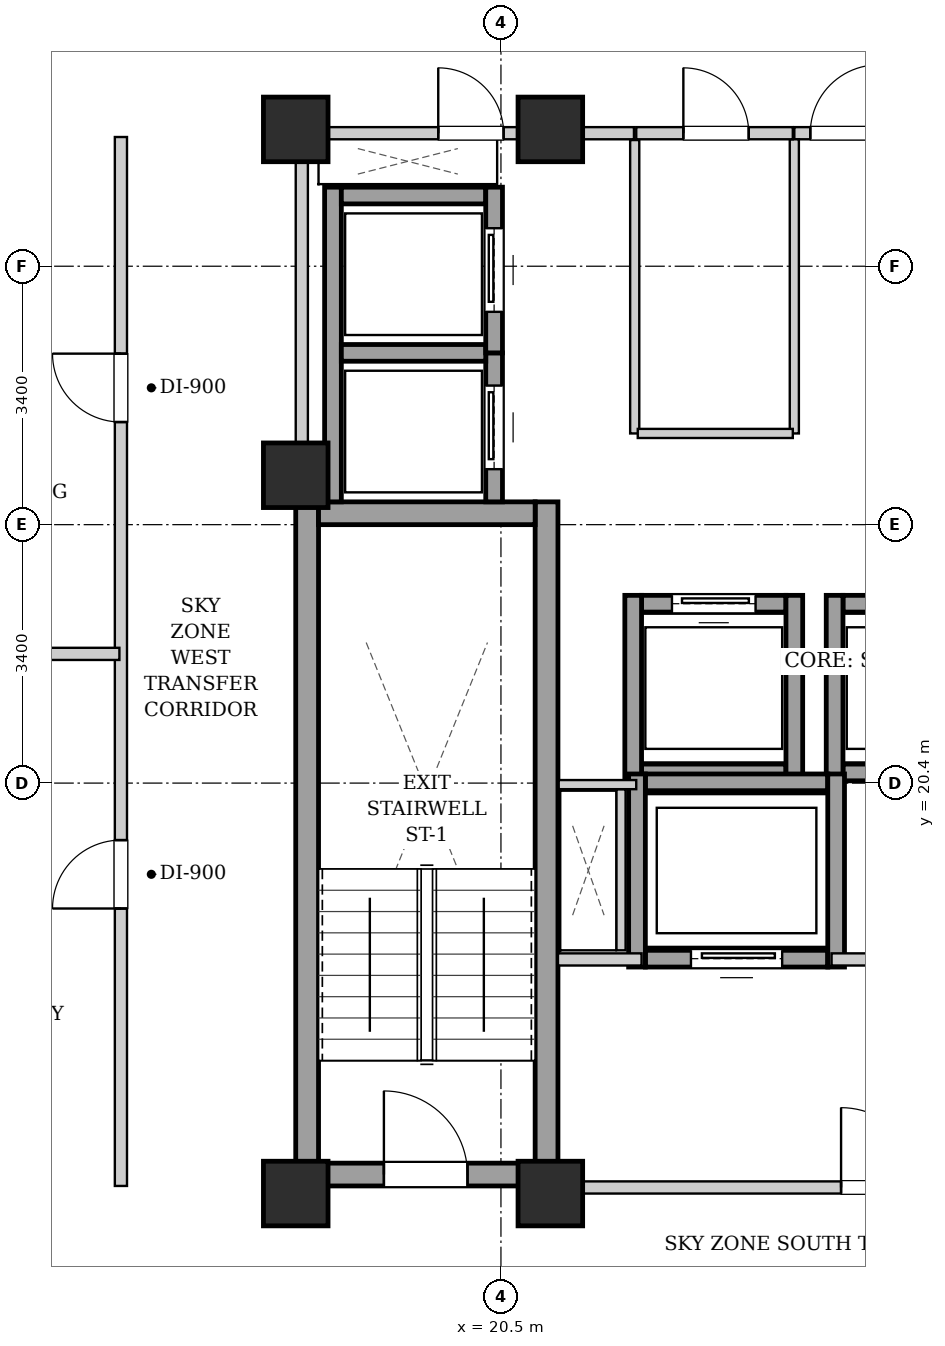
"""IFC4 building model, lengths in metres.
Left out: names, types, materials, properties, quantities, classifications, styles, units other than length and angle.
Written with IfcOpenShell. Run it as: python <this file> out.ifc"""

import sys

from ifc_helpers import new_model, si_unit, direction, frame, frame_2d, origin, origin_2d, place, context, subcontext, project, spatial, rectangle, extrude, element, fill, save


model = new_model("IFC4")
c1 = context("Model", 3, precision=1e-05, world=origin(), true_north=direction((0.0, 1.0)))
c2 = subcontext(c1, "Body", "Model", "MODEL_VIEW")
j1 = project(units=[si_unit("LENGTHUNIT", "METRE"), si_unit("PLANEANGLEUNIT", "RADIAN")], contexts=[c1])
p1 = place(None, origin())
s1 = spatial("IfcSite", under=j1, at=p1, CompositionType="ELEMENT")
p2 = place(p1, origin())
s2 = spatial("IfcBuilding", under=s1, at=p2, CompositionType="ELEMENT")
p3 = place(p2, frame((0.0, 0.0, 174.4)))
s3 = spatial("IfcBuildingStorey", under=s2, at=p3, CompositionType="ELEMENT", Elevation=174.4)
for number, where, z_axis, x_axis in (
    (1, (17.8, 15.0, 0.0), (0.0, 0.0, 1.0), (1.0, 0.0, 0.0)),
    (2, (21.15, 15.0, 0.0), (0.0, 0.0, 1.0), (1.0, 0.0, 0.0)),
    (3, (17.8, 29.0, 0.0), (0.0, 0.0, 1.0), (1.0, 0.0, 0.0)),
    (4, (21.15, 29.0, 0.0), (0.0, 0.0, 1.0), (1.0, 0.0, 0.0)),
    (5, (17.8, 24.45, 0.0), (0.0, 0.0, 1.0), (1.0, 0.0, 0.0)),
):
    element("IfcColumn", number, at=place(p3, frame(where, z_axis=z_axis, x_axis=x_axis)), inside=s3, PredefinedType="COLUMN", context=c2, shape_type="SweptSolid", body=[
        extrude(rectangle(XDim=0.85, YDim=0.85, at=origin_2d()), origin(), (0.0, 0.0, 1.0), 3.3),
    ])
for number, where, z_axis, x_axis in (
    (6, (17.95, 15.1, 0.0), (0.0, 0.0, 1.0), (0.0, 1.0, 0.0)),
    (7, (21.1, 15.1, 0.0), (0.0, 0.0, 1.0), (0.0, 1.0, 0.0)),
):
    element("IfcWall", number, at=place(p3, frame(where, z_axis=z_axis, x_axis=x_axis)), inside=s3, PredefinedType="SHEAR", context=c2, shape_type="SweptSolid", body=[
        extrude(rectangle(XDim=9.0, YDim=0.3, at=frame_2d((4.5, 0.0))), origin(), (0.0, 0.0, 1.0), 3.04),
    ])
p4 = place(p3, frame((18.1, 23.95, 0.0), z_axis=(0.0, 0.0, 1.0), x_axis=(1.0, 0.0, 0.0)))
e8 = element("IfcWall", 8, at=p4, inside=s3, PredefinedType="SHEAR", context=c2, shape_type="SweptSolid", body=[
    extrude(rectangle(XDim=2.85, YDim=0.3, at=frame_2d((1.425, 0.0))), origin(), (0.0, 0.0, 1.0), 3.04),
])
p5 = place(p3, frame((18.1, 15.25, 0.0), z_axis=(0.0, 0.0, 1.0), x_axis=(1.0, 0.0, 0.0)))
e9 = element("IfcWall", 9, at=p5, inside=s3, PredefinedType="SHEAR", context=c2, shape_type="SweptSolid", body=[
    extrude(rectangle(XDim=2.85, YDim=0.3, at=frame_2d((1.425, 0.0))), origin(), (0.0, 0.0, 1.0), 3.04),
])
p6 = place(p5, frame((0.86, 0.0, 0.0)))
e10 = element("IfcOpeningElement", 10, at=p6, cuts=e9, PredefinedType="OPENING", context=c2, shape_type="SweptSolid", body=[
    extrude(rectangle(XDim=1.1, YDim=2.05, at=frame_2d((0.55, 1.025))), frame((0.0, 0.16, 0.0), z_axis=(0.0, -1.0, 0.0), x_axis=(1.0, 0.0, 0.0)), (0.0, 0.0, 1.0), 0.32),
])
p7 = place(p3, frame((22.35, 20.54, 0.0), z_axis=(0.0, 0.0, 1.0), x_axis=(1.0, 0.0, 0.0)))
e11 = element("IfcWall", 11, at=p7, inside=s3, PredefinedType="SHEAR", context=c2, shape_type="SweptSolid", body=[
    extrude(rectangle(XDim=1.9, YDim=0.22, at=frame_2d((0.95, 0.0))), origin(), (0.0, 0.0, 1.0), 3.04),
])
p8 = place(p3, frame((22.35, 22.76, 0.0), z_axis=(0.0, 0.0, 1.0), x_axis=(1.0, 0.0, 0.0)))
e12 = element("IfcWall", 12, at=p8, inside=s3, PredefinedType="SHEAR", context=c2, shape_type="SweptSolid", body=[
    extrude(rectangle(XDim=1.9, YDim=0.22, at=frame_2d((0.95, 0.0))), origin(), (0.0, 0.0, 1.0), 3.04),
])
p9 = place(p8, frame((0.4, 0.0, 0.0)))
e13 = element("IfcOpeningElement", 13, at=p9, cuts=e12, PredefinedType="OPENING", context=c2, shape_type="SweptSolid", body=[
    extrude(rectangle(XDim=1.1, YDim=2.15, at=frame_2d((0.55, 1.075))), frame((0.0, 0.12, 0.0), z_axis=(0.0, -1.0, 0.0), x_axis=(1.0, 0.0, 0.0)), (0.0, 0.0, 1.0), 0.24),
])
for number, where, z_axis, x_axis in (
    (14, (22.24, 20.43, 0.0), (0.0, 0.0, 1.0), (0.0, 1.0, 0.0)),
    (15, (24.36, 20.43, 0.0), (0.0, 0.0, 1.0), (0.0, 1.0, 0.0)),
):
    element("IfcWall", number, at=place(p3, frame(where, z_axis=z_axis, x_axis=x_axis)), inside=s3, PredefinedType="SHEAR", context=c2, shape_type="SweptSolid", body=[
        extrude(rectangle(XDim=2.44, YDim=0.22, at=frame_2d((1.22, 0.0))), origin(), (0.0, 0.0, 1.0), 3.04),
    ])
p10 = place(p3, frame((25.0, 20.54, 0.0), z_axis=(0.0, 0.0, 1.0), x_axis=(1.0, 0.0, 0.0)))
e16 = element("IfcWall", 16, at=p10, inside=s3, PredefinedType="SHEAR", context=c2, shape_type="SweptSolid", body=[
    extrude(rectangle(XDim=1.9, YDim=0.22, at=frame_2d((0.95, 0.0))), origin(), (0.0, 0.0, 1.0), 3.04),
])
p11 = place(p3, frame((25.0, 22.76, 0.0), z_axis=(0.0, 0.0, 1.0), x_axis=(1.0, 0.0, 0.0)))
e17 = element("IfcWall", 17, at=p11, inside=s3, PredefinedType="SHEAR", context=c2, shape_type="SweptSolid", body=[
    extrude(rectangle(XDim=1.9, YDim=0.22, at=frame_2d((0.95, 0.0))), origin(), (0.0, 0.0, 1.0), 3.04),
])
p12 = place(p11, frame((0.4, 0.0, 0.0)))
e18 = element("IfcOpeningElement", 18, at=p12, cuts=e17, PredefinedType="OPENING", context=c2, shape_type="SweptSolid", body=[
    extrude(rectangle(XDim=1.1, YDim=2.15, at=frame_2d((0.55, 1.075))), frame((0.0, 0.12, 0.0), z_axis=(0.0, -1.0, 0.0), x_axis=(1.0, 0.0, 0.0)), (0.0, 0.0, 1.0), 0.24),
])
p13 = place(p3, frame((24.89, 20.43, 0.0), z_axis=(0.0, 0.0, 1.0), x_axis=(0.0, 1.0, 0.0)))
e19 = element("IfcWall", 19, at=p13, inside=s3, PredefinedType="SHEAR", context=c2, shape_type="SweptSolid", body=[
    extrude(rectangle(XDim=2.44, YDim=0.22, at=frame_2d((1.22, 0.0))), origin(), (0.0, 0.0, 1.0), 3.04),
])
p14 = place(p3, frame((18.29, 24.1, 0.0), z_axis=(0.0, 0.0, 1.0), x_axis=(0.0, 1.0, 0.0)))
e20 = element("IfcWall", 20, at=p14, inside=s3, PredefinedType="SHEAR", context=c2, shape_type="SweptSolid", body=[
    extrude(rectangle(XDim=4.14, YDim=0.22, at=frame_2d((2.07, 0.0))), origin(), (0.0, 0.0, 1.0), 3.04),
])
p15 = place(p3, frame((20.41, 24.1, 0.0), z_axis=(0.0, 0.0, 1.0), x_axis=(0.0, 1.0, 0.0)))
e21 = element("IfcWall", 21, at=p15, inside=s3, PredefinedType="SHEAR", context=c2, shape_type="SweptSolid", body=[
    extrude(rectangle(XDim=1.96, YDim=0.22, at=frame_2d((0.98, 0.0))), origin(), (0.0, 0.0, 1.0), 3.04),
])
p16 = place(p15, frame((0.43, 0.0, 0.0)))
e22 = element("IfcOpeningElement", 22, at=p16, cuts=e21, PredefinedType="OPENING", context=c2, shape_type="SweptSolid", body=[
    extrude(rectangle(XDim=1.1, YDim=2.15, at=frame_2d((0.55, 1.075))), frame((0.0, 0.12, 0.0), z_axis=(0.0, -1.0, 0.0), x_axis=(1.0, 0.0, 0.0)), (0.0, 0.0, 1.0), 0.24),
])
for number, where, z_axis, x_axis in (
    (23, (18.4, 26.06, 0.0), (0.0, 0.0, 1.0), (1.0, 0.0, 0.0)),
    (24, (18.4, 28.13, 0.0), (0.0, 0.0, 1.0), (1.0, 0.0, 0.0)),
):
    element("IfcWall", number, at=place(p3, frame(where, z_axis=z_axis, x_axis=x_axis)), inside=s3, PredefinedType="SHEAR", context=c2, shape_type="SweptSolid", body=[
        extrude(rectangle(XDim=1.9, YDim=0.22, at=frame_2d((0.95, 0.0))), origin(), (0.0, 0.0, 1.0), 3.04),
    ])
p17 = place(p3, frame((20.41, 26.06, 0.0), z_axis=(0.0, 0.0, 1.0), x_axis=(0.0, 1.0, 0.0)))
e25 = element("IfcWall", 25, at=p17, inside=s3, PredefinedType="SHEAR", context=c2, shape_type="SweptSolid", body=[
    extrude(rectangle(XDim=2.18, YDim=0.22, at=frame_2d((1.09, 0.0))), origin(), (0.0, 0.0, 1.0), 3.04),
])
p18 = place(p17, frame((0.54, 0.0, 0.0)))
e26 = element("IfcOpeningElement", 26, at=p18, cuts=e25, PredefinedType="OPENING", context=c2, shape_type="SweptSolid", body=[
    extrude(rectangle(XDim=1.1, YDim=2.15, at=frame_2d((0.55, 1.075))), frame((0.0, 0.12, 0.0), z_axis=(0.0, -1.0, 0.0), x_axis=(1.0, 0.0, 0.0)), (0.0, 0.0, 1.0), 0.24),
])
p19 = place(p3, frame((22.4, 18.09, 0.0), z_axis=(0.0, 0.0, 1.0), x_axis=(1.0, 0.0, 0.0)))
e27 = element("IfcWall", 27, at=p19, inside=s3, PredefinedType="SHEAR", context=c2, shape_type="SweptSolid", body=[
    extrude(rectangle(XDim=2.4, YDim=0.22, at=frame_2d((1.2, 0.0))), origin(), (0.0, 0.0, 1.0), 3.04),
])
p20 = place(p19, frame((0.6, 0.0, 0.0)))
e28 = element("IfcOpeningElement", 28, at=p20, cuts=e27, PredefinedType="OPENING", context=c2, shape_type="SweptSolid", body=[
    extrude(rectangle(XDim=1.2, YDim=2.15, at=frame_2d((0.6, 1.075))), frame((0.0, 0.12, 0.0), z_axis=(0.0, -1.0, 0.0), x_axis=(1.0, 0.0, 0.0)), (0.0, 0.0, 1.0), 0.24),
])
p21 = place(p3, frame((22.4, 20.41, 0.0), z_axis=(0.0, 0.0, 1.0), x_axis=(1.0, 0.0, 0.0)))
e29 = element("IfcWall", 29, at=p21, inside=s3, PredefinedType="SHEAR", context=c2, shape_type="SweptSolid", body=[
    extrude(rectangle(XDim=2.4, YDim=0.22, at=frame_2d((1.2, 0.0))), origin(), (0.0, 0.0, 1.0), 3.04),
])
for number, where, z_axis, x_axis in (
    (30, (22.29, 17.98, 0.0), (0.0, 0.0, 1.0), (0.0, 1.0, 0.0)),
    (31, (24.91, 17.98, 0.0), (0.0, 0.0, 1.0), (0.0, 1.0, 0.0)),
):
    element("IfcWall", number, at=place(p3, frame(where, z_axis=z_axis, x_axis=x_axis)), inside=s3, PredefinedType="SHEAR", context=c2, shape_type="SweptSolid", body=[
        extrude(rectangle(XDim=2.54, YDim=0.22, at=frame_2d((1.27, 0.0))), origin(), (0.0, 0.0, 1.0), 3.04),
    ])
p22 = place(p3, frame((21.25, 15.08, 0.0), z_axis=(0.0, 0.0, 1.0), x_axis=(1.0, 0.0, 0.0)))
e32 = element("IfcWall", 32, at=p22, inside=s3, PredefinedType="PARTITIONING", context=c2, shape_type="SweptSolid", body=[
    extrude(rectangle(XDim=8.5, YDim=0.16, at=frame_2d((4.25, 0.0))), origin(), (0.0, 0.0, 1.0), 2.556),
])
p23 = place(p22, frame((3.725, 0.0, 0.0)))
e33 = element("IfcOpeningElement", 33, at=p23, cuts=e32, PredefinedType="OPENING", context=c2, shape_type="SweptSolid", body=[
    extrude(rectangle(XDim=1.05, YDim=2.05, at=frame_2d((0.525, 1.025))), frame((0.0, 0.09, 0.0), z_axis=(0.0, -1.0, 0.0), x_axis=(1.0, 0.0, 0.0)), (0.0, 0.0, 1.0), 0.18),
])
p24 = place(p3, frame((21.25, 18.08, 0.0), z_axis=(0.0, 0.0, 1.0), x_axis=(1.0, 0.0, 0.0)))
e34 = element("IfcWall", 34, at=p24, inside=s3, PredefinedType="PARTITIONING", context=c2, shape_type="SweptSolid", body=[
    extrude(rectangle(XDim=1.1, YDim=0.16, at=frame_2d((0.55, 0.0))), origin(), (0.0, 0.0, 1.0), 3.04),
])
p25 = place(p3, frame((24.85, 18.08, 0.0), z_axis=(0.0, 0.0, 1.0), x_axis=(1.0, 0.0, 0.0)))
e35 = element("IfcWall", 35, at=p25, inside=s3, PredefinedType="PARTITIONING", context=c2, shape_type="SweptSolid", body=[
    extrude(rectangle(XDim=1.3, YDim=0.16, at=frame_2d((0.65, 0.0))), origin(), (0.0, 0.0, 1.0), 3.04),
])
p26 = place(p3, frame((17.88, 24.12, 0.0), z_axis=(0.0, 0.0, 1.0), x_axis=(0.0, 1.0, 0.0)))
e36 = element("IfcWall", 36, at=p26, inside=s3, PredefinedType="PARTITIONING", context=c2, shape_type="SweptSolid", body=[
    extrude(rectangle(XDim=4.76, YDim=0.16, at=frame_2d((2.38, 0.0))), origin(), (0.0, 0.0, 1.0), 3.04),
])
p27 = place(p3, frame((24.36, 28.95, 0.0), z_axis=(0.0, 0.0, 1.0), x_axis=(1.0, 0.0, 0.0)))
e37 = element("IfcWall", 37, at=p27, inside=s3, PredefinedType="PARTITIONING", context=c2, shape_type="SweptSolid", body=[
    extrude(rectangle(XDim=1.32, YDim=0.16, at=frame_2d((0.66, 0.0))), origin(), (0.0, 0.0, 1.0), 2.556),
])
p28 = place(p27, frame((0.21, 0.0, 0.0)))
e38 = element("IfcOpeningElement", 38, at=p28, cuts=e37, PredefinedType="OPENING", context=c2, shape_type="SweptSolid", body=[
    extrude(rectangle(XDim=0.9, YDim=2.05, at=frame_2d((0.45, 1.025))), frame((0.0, 0.09, 0.0), z_axis=(0.0, -1.0, 0.0), x_axis=(1.0, 0.0, 0.0)), (0.0, 0.0, 1.0), 0.18),
])
p29 = place(p3, frame((17.96, 28.95, 0.0), z_axis=(0.0, 0.0, 1.0), x_axis=(1.0, 0.0, 0.0)))
e39 = element("IfcWall", 39, at=p29, inside=s3, PredefinedType="PARTITIONING", context=c2, shape_type="SweptSolid", body=[
    extrude(rectangle(XDim=4.29, YDim=0.16, at=frame_2d((2.145, 0.0))), origin(), (0.0, 0.0, 1.0), 2.556),
])
p30 = place(p29, frame((1.715, 0.0, 0.0)))
e40 = element("IfcOpeningElement", 40, at=p30, cuts=e39, PredefinedType="OPENING", context=c2, shape_type="SweptSolid", body=[
    extrude(rectangle(XDim=0.86, YDim=2.05, at=frame_2d((0.43, 1.025))), frame((0.0, 0.09, 0.0), z_axis=(0.0, -1.0, 0.0), x_axis=(1.0, 0.0, 0.0)), (0.0, 0.0, 1.0), 0.18),
])
p31 = place(p3, frame((22.08, 18.2, 0.0), z_axis=(0.0, 0.0, 1.0), x_axis=(0.0, 1.0, 0.0)))
e41 = element("IfcWall", 41, at=p31, inside=s3, PredefinedType="PARTITIONING", context=c2, shape_type="SweptSolid", body=[
    extrude(rectangle(XDim=2.12, YDim=0.12, at=frame_2d((1.06, 0.0))), origin(), (0.0, 0.0, 1.0), 3.04),
])
p32 = place(p3, frame((22.28, 20.38, 0.0), z_axis=(0.0, 0.0, 1.0), x_axis=(-1.0, 0.0, 0.0)))
e42 = element("IfcWall", 42, at=p32, inside=s3, PredefinedType="PARTITIONING", context=c2, shape_type="SweptSolid", body=[
    extrude(rectangle(XDim=1.02, YDim=0.12, at=frame_2d((0.51, 0.0))), origin(), (0.0, 0.0, 1.0), 3.04),
])
p33 = place(p3, frame((24.36, 25.0, 0.0), z_axis=(0.0, 0.0, 1.0), x_axis=(0.0, 1.0, 0.0)))
e43 = element("IfcWall", 43, at=p33, inside=s3, PredefinedType="PARTITIONING", context=c2, shape_type="SweptSolid", body=[
    extrude(rectangle(XDim=3.87, YDim=0.12, at=frame_2d((1.935, 0.0))), origin(), (0.0, 0.0, 1.0), 3.04),
])
p34 = place(p3, frame((22.26, 25.0, 0.0), z_axis=(0.0, 0.0, 1.0), x_axis=(0.0, 1.0, 0.0)))
e44 = element("IfcWall", 44, at=p34, inside=s3, PredefinedType="PARTITIONING", context=c2, shape_type="SweptSolid", body=[
    extrude(rectangle(XDim=3.86, YDim=0.12, at=frame_2d((1.93, 0.0))), origin(), (0.0, 0.0, 1.0), 3.04),
])
p35 = place(p3, frame((22.3, 25.0, 0.0), z_axis=(0.0, 0.0, 1.0), x_axis=(1.0, 0.0, 0.0)))
e45 = element("IfcWall", 45, at=p35, inside=s3, PredefinedType="PARTITIONING", context=c2, shape_type="SweptSolid", body=[
    extrude(rectangle(XDim=2.04, YDim=0.12, at=frame_2d((1.02, 0.0))), origin(), (0.0, 0.0, 1.0), 3.04),
])
p36 = place(p3, frame((22.28, 28.95, 0.0), z_axis=(0.0, 0.0, 1.0), x_axis=(1.0, 0.0, 0.0)))
e46 = element("IfcWall", 46, at=p36, inside=s3, PredefinedType="PARTITIONING", context=c2, shape_type="SweptSolid", body=[
    extrude(rectangle(XDim=2.06, YDim=0.16, at=frame_2d((1.03, 0.0))), origin(), (0.0, 0.0, 1.0), 2.556),
])
p37 = place(p36, frame((0.62, 0.0, 0.0)))
e47 = element("IfcOpeningElement", 47, at=p37, cuts=e46, PredefinedType="OPENING", context=c2, shape_type="SweptSolid", body=[
    extrude(rectangle(XDim=0.86, YDim=2.05, at=frame_2d((0.43, 1.025))), frame((0.0, 0.09, 0.0), z_axis=(0.0, -1.0, 0.0), x_axis=(1.0, 0.0, 0.0)), (0.0, 0.0, 1.0), 0.18),
])
p38 = place(p3, frame((15.5, 15.1, 0.0), z_axis=(0.0, 0.0, 1.0), x_axis=(0.0, 1.0, 0.0)))
e48 = element("IfcWall", 48, at=p38, inside=s3, PredefinedType="PARTITIONING", context=c2, shape_type="SweptSolid", body=[
    extrude(rectangle(XDim=13.8, YDim=0.16, at=frame_2d((6.9, 0.0))), origin(), (0.0, 0.0, 1.0), 3.04),
])
p39 = place(p38, frame((3.65, 0.0, 0.0)))
e49 = element("IfcOpeningElement", 49, at=p39, cuts=e48, PredefinedType="OPENING", context=c2, shape_type="SweptSolid", body=[
    extrude(rectangle(XDim=0.9, YDim=2.05, at=frame_2d((0.45, 1.025))), frame((0.0, 0.09, 0.0), z_axis=(0.0, -1.0, 0.0), x_axis=(1.0, 0.0, 0.0)), (0.0, 0.0, 1.0), 0.18),
])
p40 = place(p38, frame((10.05, 0.0, 0.0)))
e50 = element("IfcOpeningElement", 50, at=p40, cuts=e48, PredefinedType="OPENING", context=c2, shape_type="SweptSolid", body=[
    extrude(rectangle(XDim=0.9, YDim=2.05, at=frame_2d((0.45, 1.025))), frame((0.0, 0.09, 0.0), z_axis=(0.0, -1.0, 0.0), x_axis=(1.0, 0.0, 0.0)), (0.0, 0.0, 1.0), 0.18),
])
p41 = place(p3, frame((10.88, 22.1, 0.0), z_axis=(0.0, 0.0, 1.0), x_axis=(1.0, 0.0, 0.0)))
e51 = element("IfcWall", 51, at=p41, inside=s3, PredefinedType="PARTITIONING", context=c2, shape_type="SweptSolid", body=[
    extrude(rectangle(XDim=4.6, YDim=0.16, at=frame_2d((2.3, 0.0))), origin(), (0.0, 0.0, 1.0), 3.04),
])
p42 = place(p6, origin())
e52 = element("IfcDoor", 52, at=p42, inside=s3, OperationType="SINGLE_SWING_LEFT", PredefinedType="DOOR", context=c2, shape_type="SweptSolid", body=[
    extrude(rectangle(XDim=1.1, YDim=2.05, at=frame_2d((0.55, 1.025))), frame((0.0, 0.025, 0.0), z_axis=(0.0, -1.0, 0.0), x_axis=(1.0, 0.0, 0.0)), (0.0, 0.0, 1.0), 0.05),
])
fill(e10, e52)
p43 = place(p9, origin())
e53 = element("IfcDoor", 53, at=p43, inside=s3, OperationType="SLIDING_TO_LEFT", PredefinedType="DOOR", context=c2, shape_type="SweptSolid", body=[
    extrude(rectangle(XDim=1.1, YDim=2.15, at=frame_2d((0.55, 1.075))), frame((0.0, 0.025, 0.0), z_axis=(0.0, -1.0, 0.0), x_axis=(1.0, 0.0, 0.0)), (0.0, 0.0, 1.0), 0.05),
])
fill(e13, e53)
p44 = place(p16, origin())
e54 = element("IfcDoor", 54, at=p44, inside=s3, OperationType="SLIDING_TO_LEFT", PredefinedType="DOOR", context=c2, shape_type="SweptSolid", body=[
    extrude(rectangle(XDim=1.1, YDim=2.15, at=frame_2d((0.55, 1.075))), frame((0.0, 0.025, 0.0), z_axis=(0.0, -1.0, 0.0), x_axis=(1.0, 0.0, 0.0)), (0.0, 0.0, 1.0), 0.05),
])
fill(e22, e54)
p45 = place(p18, origin())
e55 = element("IfcDoor", 55, at=p45, inside=s3, OperationType="SLIDING_TO_LEFT", PredefinedType="DOOR", context=c2, shape_type="SweptSolid", body=[
    extrude(rectangle(XDim=1.1, YDim=2.15, at=frame_2d((0.55, 1.075))), frame((0.0, 0.025, 0.0), z_axis=(0.0, -1.0, 0.0), x_axis=(1.0, 0.0, 0.0)), (0.0, 0.0, 1.0), 0.05),
])
fill(e26, e55)
p46 = place(p20, origin())
e56 = element("IfcDoor", 56, at=p46, inside=s3, OperationType="SLIDING_TO_LEFT", PredefinedType="DOOR", context=c2, shape_type="SweptSolid", body=[
    extrude(rectangle(XDim=1.2, YDim=2.15, at=frame_2d((0.6, 1.075))), frame((0.0, 0.025, 0.0), z_axis=(0.0, -1.0, 0.0), x_axis=(1.0, 0.0, 0.0)), (0.0, 0.0, 1.0), 0.05),
])
fill(e28, e56)
p47 = place(p23, origin())
e57 = element("IfcDoor", 57, at=p47, inside=s3, OperationType="SINGLE_SWING_LEFT", PredefinedType="DOOR", context=c2, shape_type="SweptSolid", body=[
    extrude(rectangle(XDim=1.05, YDim=2.05, at=frame_2d((0.525, 1.025))), frame((0.0, 0.025, 0.0), z_axis=(0.0, -1.0, 0.0), x_axis=(1.0, 0.0, 0.0)), (0.0, 0.0, 1.0), 0.05),
])
fill(e33, e57)
p48 = place(p28, origin())
e58 = element("IfcDoor", 58, at=p48, inside=s3, OperationType="SINGLE_SWING_RIGHT", PredefinedType="DOOR", context=c2, shape_type="SweptSolid", body=[
    extrude(rectangle(XDim=0.9, YDim=2.05, at=frame_2d((0.45, 1.025))), frame((0.0, 0.025, 0.0), z_axis=(0.0, -1.0, 0.0), x_axis=(1.0, 0.0, 0.0)), (0.0, 0.0, 1.0), 0.05),
])
fill(e38, e58)
p49 = place(p30, origin())
e59 = element("IfcDoor", 59, at=p49, inside=s3, OperationType="SINGLE_SWING_LEFT", PredefinedType="DOOR", context=c2, shape_type="SweptSolid", body=[
    extrude(rectangle(XDim=0.86, YDim=2.05, at=frame_2d((0.43, 1.025))), frame((0.0, 0.025, 0.0), z_axis=(0.0, -1.0, 0.0), x_axis=(1.0, 0.0, 0.0)), (0.0, 0.0, 1.0), 0.05),
])
fill(e40, e59)
p50 = place(p37, origin())
e60 = element("IfcDoor", 60, at=p50, inside=s3, OperationType="SINGLE_SWING_LEFT", PredefinedType="DOOR", context=c2, shape_type="SweptSolid", body=[
    extrude(rectangle(XDim=0.86, YDim=2.05, at=frame_2d((0.43, 1.025))), frame((0.0, 0.025, 0.0), z_axis=(0.0, -1.0, 0.0), x_axis=(1.0, 0.0, 0.0)), (0.0, 0.0, 1.0), 0.05),
])
fill(e47, e60)
p51 = place(p39, origin())
e61 = element("IfcDoor", 61, at=p51, inside=s3, OperationType="SINGLE_SWING_LEFT", PredefinedType="DOOR", context=c2, shape_type="SweptSolid", body=[
    extrude(rectangle(XDim=0.9, YDim=2.05, at=frame_2d((0.45, 1.025))), frame((0.0, 0.025, 0.0), z_axis=(0.0, -1.0, 0.0), x_axis=(1.0, 0.0, 0.0)), (0.0, 0.0, 1.0), 0.05),
])
fill(e49, e61)
p52 = place(p40, origin())
e62 = element("IfcDoor", 62, at=p52, inside=s3, OperationType="SINGLE_SWING_RIGHT", PredefinedType="DOOR", context=c2, shape_type="SweptSolid", body=[
    extrude(rectangle(XDim=0.9, YDim=2.05, at=frame_2d((0.45, 1.025))), frame((0.0, 0.025, 0.0), z_axis=(0.0, -1.0, 0.0), x_axis=(1.0, 0.0, 0.0)), (0.0, 0.0, 1.0), 0.05),
])
fill(e50, e62)
save(model, sys.argv[1])
